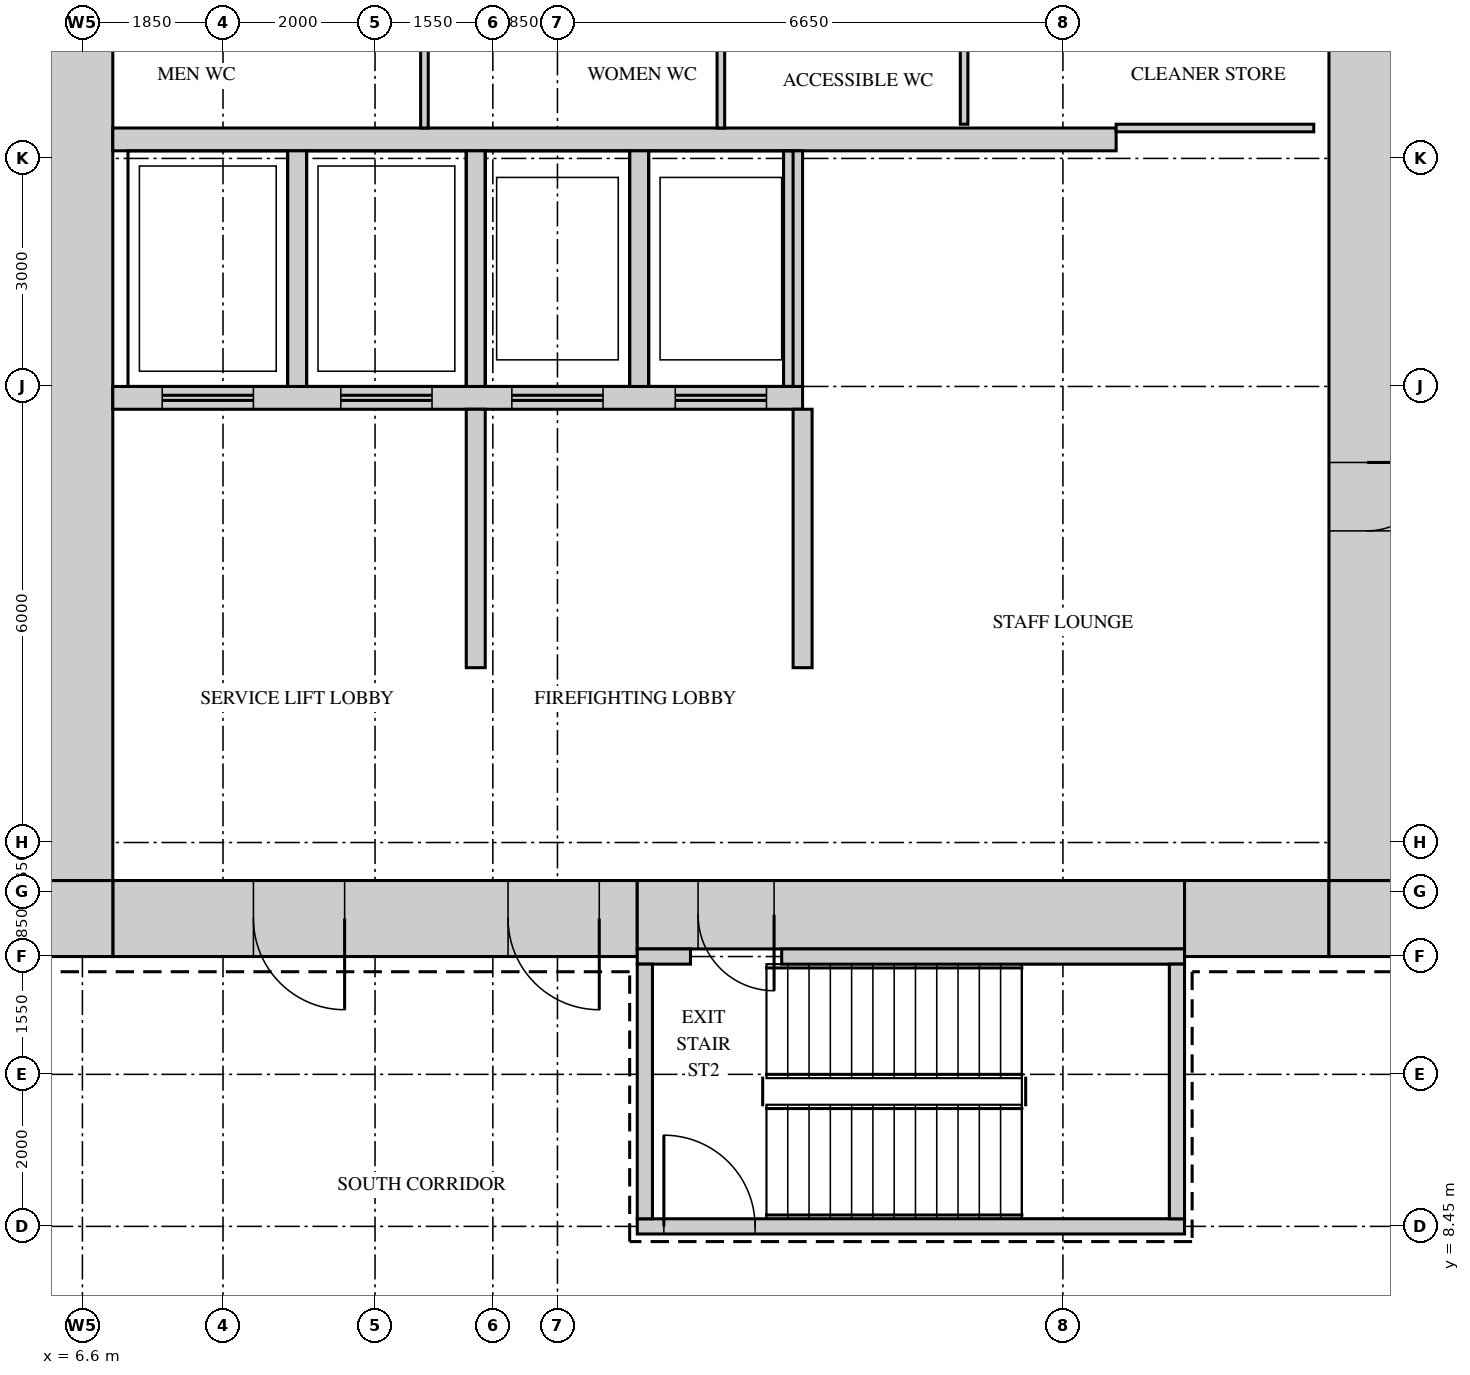
"""IFC4 building model, lengths in metres.
Left out: names, types, materials, properties, quantities, classifications, styles, units other than length and angle.
Written with IfcOpenShell. Run it as: python <this file> out.ifc"""

import sys

from ifc_helpers import new_model, si_unit, direction, frame, frame_2d, origin, place, context, subcontext, project, spatial, rectangle, extrude, source, transform, mapped, element, fill, save


model = new_model("IFC4")
c1 = context("Model", 3, precision=1e-05, world=origin(), true_north=direction((0.0, 1.0)))
c2 = subcontext(c1, "Body", "Model", "MODEL_VIEW")
j1 = project(units=[si_unit("LENGTHUNIT", "METRE"), si_unit("PLANEANGLEUNIT", "RADIAN")], contexts=[c1])
p1 = place(None, origin())
s1 = spatial("IfcSite", under=j1, at=p1, CompositionType="ELEMENT")
p2 = place(p1, origin())
s2 = spatial("IfcBuilding", under=s1, at=p2, CompositionType="ELEMENT")
p3 = place(p2, frame((0.0, 0.0, 141.1)))
s3 = spatial("IfcBuildingStorey", under=s2, at=p3, CompositionType="ELEMENT", Elevation=141.1)
m1 = source(origin(), c2, "Body", "SweptSolid", [
    extrude(rectangle(XDim=6.9, YDim=1.0, at=frame_2d((3.45, 0.0))), origin(), (0.0, 0.0, 1.0), 4.1),
])
p4 = place(p3, frame((7.0, 12.5, 0.0), z_axis=(0.0, 0.0, 1.0), x_axis=(1.0, 0.0, 0.0)))
e1 = element("IfcWall", 1, at=p4, inside=s3, PredefinedType="SHEAR", context=c2, shape_type="MappedRepresentation", body=[
    mapped(m1, transform((0.0, 0.0, 0.0))),
])
m2 = source(origin(), c2, "Body", "SweptSolid", [
    extrude(rectangle(XDim=1.2, YDim=2.1, at=frame_2d((0.6, 1.05))), frame((0.0, 0.51, 0.0), z_axis=(0.0, -1.0, 0.0), x_axis=(1.0, 0.0, 0.0)), (0.0, 0.0, 1.0), 1.02),
])
p5 = place(p4, frame((5.2, 0.0, 0.0)))
e2 = element("IfcOpeningElement", 2, at=p5, cuts=e1, PredefinedType="OPENING", context=c2, shape_type="MappedRepresentation", body=[
    mapped(m2, transform((0.0, 0.0, 0.0))),
])
p6 = place(p4, frame((1.85, 0.0, 0.0)))
e3 = element("IfcOpeningElement", 3, at=p6, cuts=e1, PredefinedType="OPENING", context=c2, shape_type="MappedRepresentation", body=[
    mapped(m2, transform((0.0, 0.0, 0.0))),
])
m3 = source(origin(), c2, "Body", "SweptSolid", [
    extrude(rectangle(XDim=7.2, YDim=0.9, at=frame_2d((3.6, 0.0))), origin(), (0.0, 0.0, 1.0), 4.1),
])
p7 = place(p3, frame((13.9, 12.55, 0.0), z_axis=(0.0, 0.0, 1.0), x_axis=(1.0, 0.0, 0.0)))
e4 = element("IfcWall", 4, at=p7, inside=s3, PredefinedType="SHEAR", context=c2, shape_type="MappedRepresentation", body=[
    mapped(m3, transform((0.0, 0.0, 0.0))),
])
m4 = source(origin(), c2, "Body", "SweptSolid", [
    extrude(rectangle(XDim=1.0, YDim=2.1, at=frame_2d((0.5, 1.05))), frame((0.0, 0.46, 0.0), z_axis=(0.0, -1.0, 0.0), x_axis=(1.0, 0.0, 0.0)), (0.0, 0.0, 1.0), 0.92),
])
p8 = place(p7, frame((0.8, 0.0, 0.0)))
e5 = element("IfcOpeningElement", 5, at=p8, cuts=e4, PredefinedType="OPENING", context=c2, shape_type="MappedRepresentation", body=[
    mapped(m4, transform((0.0, 0.0, 0.0))),
])
m5 = source(origin(), c2, "Body", "SweptSolid", [
    extrude(rectangle(XDim=1.9, YDim=1.0, at=frame_2d((0.95, 0.0))), origin(), (0.0, 0.0, 1.0), 4.1),
])
p9 = place(p3, frame((21.1, 12.5, 0.0), z_axis=(0.0, 0.0, 1.0), x_axis=(1.0, 0.0, 0.0)))
e6 = element("IfcWall", 6, at=p9, inside=s3, PredefinedType="SHEAR", context=c2, shape_type="MappedRepresentation", body=[
    mapped(m5, transform((0.0, 0.0, 0.0))),
])
m6 = source(origin(), c2, "Body", "SweptSolid", [
    extrude(rectangle(XDim=1.0, YDim=1.0, at=frame_2d((0.5, 0.0))), origin(), (0.0, 0.0, 1.0), 4.1),
])
for number, where, z_axis, x_axis in (
    (7, (23.0, 12.5, 0.0), (0.0, 0.0, 1.0), (1.0, 0.0, 0.0)),
    (8, (6.0, 12.5, 0.0), (0.0, 0.0, 1.0), (1.0, 0.0, 0.0)),
):
    element("IfcWall", number, at=place(p3, frame(where, z_axis=z_axis, x_axis=x_axis)), inside=s3, PredefinedType="SHEAR", context=c2, shape_type="MappedRepresentation", body=[
        mapped(m6, transform((0.0, 0.0, 0.0))),
    ])
m7 = source(origin(), c2, "Body", "SweptSolid", [
    extrude(rectangle(XDim=28.0, YDim=1.0, at=frame_2d((14.0, 0.0))), origin(), (0.0, 0.0, 1.0), 4.1),
])
p10 = place(p3, frame((23.5, 13.0, 0.0), z_axis=(0.0, 0.0, 1.0), x_axis=(0.0, 1.0, 0.0)))
e9 = element("IfcWall", 9, at=p10, inside=s3, PredefinedType="SHEAR", context=c2, shape_type="MappedRepresentation", body=[
    mapped(m7, transform((0.0, 0.0, 0.0))),
])
m8 = source(origin(), c2, "Body", "SweptSolid", [
    extrude(rectangle(XDim=1.8, YDim=2.1, at=frame_2d((0.9, 1.05))), frame((0.0, 0.51, 0.0), z_axis=(0.0, -1.0, 0.0), x_axis=(1.0, 0.0, 0.0)), (0.0, 0.0, 1.0), 1.02),
])
p11 = place(p10, frame((22.6, 0.0, 0.0)))
e10 = element("IfcOpeningElement", 10, at=p11, cuts=e9, PredefinedType="OPENING", context=c2, shape_type="MappedRepresentation", body=[
    mapped(m8, transform((0.0, 0.0, 0.0))),
])
p12 = place(p10, frame((12.35, 0.0, 0.0)))
e11 = element("IfcOpeningElement", 11, at=p12, cuts=e9, PredefinedType="OPENING", context=c2, shape_type="MappedRepresentation", body=[
    mapped(m2, transform((0.0, 0.0, 0.0))),
])
m9 = source(origin(), c2, "Body", "SweptSolid", [
    extrude(rectangle(XDim=0.9, YDim=2.1, at=frame_2d((0.45, 1.05))), frame((0.0, 0.51, 0.0), z_axis=(0.0, -1.0, 0.0), x_axis=(1.0, 0.0, 0.0)), (0.0, 0.0, 1.0), 1.02),
])
p13 = place(p10, frame((4.6, 0.0, 0.0)))
e12 = element("IfcOpeningElement", 12, at=p13, cuts=e9, PredefinedType="OPENING", context=c2, shape_type="MappedRepresentation", body=[
    mapped(m9, transform((0.0, 0.0, 0.0))),
])
p14 = place(p3, frame((6.5, 13.0, 0.0), z_axis=(0.0, 0.0, 1.0), x_axis=(0.0, 1.0, 0.0)))
e13 = element("IfcWall", 13, at=p14, inside=s3, PredefinedType="SHEAR", context=c2, shape_type="MappedRepresentation", body=[
    mapped(m7, transform((0.0, 0.0, 0.0))),
])
m10 = source(origin(), c2, "Body", "SweptSolid", [
    extrude(rectangle(XDim=0.7, YDim=0.2, at=frame_2d((0.35, 0.0))), origin(), (0.0, 0.0, 1.0), 4.1),
])
p15 = place(p3, frame((13.9, 12.0, 0.0), z_axis=(0.0, 0.0, 1.0), x_axis=(1.0, 0.0, 0.0)))
e14 = element("IfcWall", 14, at=p15, inside=s3, PredefinedType="SHEAR", context=c2, shape_type="MappedRepresentation", body=[
    mapped(m10, transform((0.0, 0.0, 0.0))),
])
m11 = source(origin(), c2, "Body", "SweptSolid", [
    extrude(rectangle(XDim=5.3, YDim=0.2, at=frame_2d((2.65, 0.0))), origin(), (0.0, 0.0, 1.0), 4.1),
])
p16 = place(p3, frame((15.8, 12.0, 0.0), z_axis=(0.0, 0.0, 1.0), x_axis=(1.0, 0.0, 0.0)))
e15 = element("IfcWall", 15, at=p16, inside=s3, PredefinedType="SHEAR", context=c2, shape_type="MappedRepresentation", body=[
    mapped(m11, transform((0.0, 0.0, 0.0))),
])
m12 = source(origin(), c2, "Body", "SweptSolid", [
    extrude(rectangle(XDim=7.2, YDim=0.2, at=frame_2d((3.6, 0.0))), origin(), (0.0, 0.0, 1.0), 4.1),
])
p17 = place(p3, frame((13.9, 8.45, 0.0), z_axis=(0.0, 0.0, 1.0), x_axis=(1.0, 0.0, 0.0)))
e16 = element("IfcWall", 16, at=p17, inside=s3, PredefinedType="SHEAR", context=c2, shape_type="MappedRepresentation", body=[
    mapped(m12, transform((0.0, 0.0, 0.0))),
])
m13 = source(origin(), c2, "Body", "SweptSolid", [
    extrude(rectangle(XDim=1.2, YDim=2.1, at=frame_2d((0.6, 1.05))), frame((0.0, 0.11, 0.0), z_axis=(0.0, -1.0, 0.0), x_axis=(1.0, 0.0, 0.0)), (0.0, 0.0, 1.0), 0.22),
])
p18 = place(p17, frame((0.35, 0.0, 0.0)))
e17 = element("IfcOpeningElement", 17, at=p18, cuts=e16, PredefinedType="OPENING", context=c2, shape_type="MappedRepresentation", body=[
    mapped(m13, transform((0.0, 0.0, 0.0))),
])
m14 = source(origin(), c2, "Body", "SweptSolid", [
    extrude(rectangle(XDim=3.35, YDim=0.2, at=frame_2d((1.675, 0.0))), origin(), (0.0, 0.0, 1.0), 4.1),
])
for number, where, z_axis, x_axis in (
    (18, (21.0, 8.55, 0.0), (0.0, 0.0, 1.0), (0.0, 1.0, 0.0)),
    (19, (14.0, 8.55, 0.0), (0.0, 0.0, 1.0), (0.0, 1.0, 0.0)),
):
    element("IfcWall", number, at=place(p3, frame(where, z_axis=z_axis, x_axis=x_axis)), inside=s3, PredefinedType="SHEAR", context=c2, shape_type="MappedRepresentation", body=[
        mapped(m14, transform((0.0, 0.0, 0.0))),
    ])
m15 = source(origin(), c2, "Body", "SweptSolid", [
    extrude(rectangle(XDim=13.2, YDim=0.3, at=frame_2d((6.6, 0.0))), origin(), (0.0, 0.0, 1.0), 4.1),
])
p19 = place(p3, frame((7.0, 22.75, 0.0), z_axis=(0.0, 0.0, 1.0), x_axis=(1.0, 0.0, 0.0)))
e20 = element("IfcWall", 20, at=p19, inside=s3, PredefinedType="STANDARD", context=c2, shape_type="MappedRepresentation", body=[
    mapped(m15, transform((0.0, 0.0, 0.0))),
])
m16 = source(origin(), c2, "Body", "SweptSolid", [
    extrude(rectangle(XDim=9.075, YDim=0.3, at=frame_2d((4.538, 0.0))), origin(), (0.0, 0.0, 1.0), 4.1),
])
p20 = place(p3, frame((7.0, 19.35, 0.0), z_axis=(0.0, 0.0, 1.0), x_axis=(1.0, 0.0, 0.0)))
e21 = element("IfcWall", 21, at=p20, inside=s3, PredefinedType="STANDARD", context=c2, shape_type="MappedRepresentation", body=[
    mapped(m16, transform((0.0, 0.0, 0.0))),
])
m17 = source(origin(), c2, "Body", "SweptSolid", [
    extrude(rectangle(XDim=1.2, YDim=2.1, at=frame_2d((0.6, 1.05))), frame((0.0, 0.16, 0.0), z_axis=(0.0, -1.0, 0.0), x_axis=(1.0, 0.0, 0.0)), (0.0, 0.0, 1.0), 0.32),
])
p21 = place(p20, frame((0.65, 0.0, 0.0)))
e22 = element("IfcOpeningElement", 22, at=p21, cuts=e21, PredefinedType="OPENING", context=c2, shape_type="MappedRepresentation", body=[
    mapped(m17, transform((0.0, 0.0, 0.0))),
])
p22 = place(p20, frame((3.0, 0.0, 0.0)))
e23 = element("IfcOpeningElement", 23, at=p22, cuts=e21, PredefinedType="OPENING", context=c2, shape_type="MappedRepresentation", body=[
    mapped(m17, transform((0.0, 0.0, 0.0))),
])
p23 = place(p20, frame((5.25, 0.0, 0.0)))
e24 = element("IfcOpeningElement", 24, at=p23, cuts=e21, PredefinedType="OPENING", context=c2, shape_type="MappedRepresentation", body=[
    mapped(m17, transform((0.0, 0.0, 0.0))),
])
p24 = place(p20, frame((7.4, 0.0, 0.0)))
e25 = element("IfcOpeningElement", 25, at=p24, cuts=e21, PredefinedType="OPENING", context=c2, shape_type="MappedRepresentation", body=[
    mapped(m17, transform((0.0, 0.0, 0.0))),
])
m18 = source(origin(), c2, "Body", "SweptSolid", [
    extrude(rectangle(XDim=3.1, YDim=0.25, at=frame_2d((1.55, 0.0))), origin(), (0.0, 0.0, 1.0), 4.1),
])
for number, where, z_axis, x_axis in (
    (26, (9.425, 19.5, 0.0), (0.0, 0.0, 1.0), (0.0, 1.0, 0.0)),
    (27, (11.775, 19.5, 0.0), (0.0, 0.0, 1.0), (0.0, 1.0, 0.0)),
    (28, (13.925, 19.5, 0.0), (0.0, 0.0, 1.0), (0.0, 1.0, 0.0)),
    (29, (15.95, 19.5, 0.0), (0.0, 0.0, 1.0), (0.0, 1.0, 0.0)),
):
    element("IfcWall", number, at=place(p3, frame(where, z_axis=z_axis, x_axis=x_axis)), inside=s3, PredefinedType="STANDARD", context=c2, shape_type="MappedRepresentation", body=[
        mapped(m18, transform((0.0, 0.0, 0.0))),
    ])
m19 = source(origin(), c2, "Body", "SweptSolid", [
    extrude(rectangle(XDim=3.4, YDim=0.25, at=frame_2d((1.7, 0.0))), origin(), (0.0, 0.0, 1.0), 4.1),
])
for number, where, z_axis, x_axis in (
    (30, (16.075, 15.8, 0.0), (0.0, 0.0, 1.0), (0.0, 1.0, 0.0)),
    (31, (11.775, 15.8, 0.0), (0.0, 0.0, 1.0), (0.0, 1.0, 0.0)),
):
    element("IfcWall", number, at=place(p3, frame(where, z_axis=z_axis, x_axis=x_axis)), inside=s3, PredefinedType="STANDARD", context=c2, shape_type="MappedRepresentation", body=[
        mapped(m19, transform((0.0, 0.0, 0.0))),
    ])
m20 = source(origin(), c2, "Body", "SweptSolid", [
    extrude(rectangle(XDim=2.05, YDim=0.1, at=frame_2d((1.025, 0.0))), origin(), (0.0, 0.0, 1.0), 4.2),
])
for number, where, z_axis, x_axis in (
    (32, (11.1, 22.9, 0.0), (0.0, 0.0, 1.0), (0.0, 1.0, 0.0)),
    (33, (15.0, 22.9, 0.0), (0.0, 0.0, 1.0), (0.0, 1.0, 0.0)),
):
    element("IfcWall", number, at=place(p3, frame(where, z_axis=z_axis, x_axis=x_axis)), inside=s3, PredefinedType="PARTITIONING", context=c2, shape_type="MappedRepresentation", body=[
        mapped(m20, transform((0.0, 0.0, 0.0))),
    ])
m21 = source(origin(), c2, "Body", "SweptSolid", [
    extrude(rectangle(XDim=2.6, YDim=0.1, at=frame_2d((1.3, 0.0))), origin(), (0.0, 0.0, 1.0), 4.2),
])
p25 = place(p3, frame((20.2, 22.9, 0.0), z_axis=(0.0, 0.0, 1.0), x_axis=(1.0, 0.0, 0.0)))
e34 = element("IfcWall", 34, at=p25, inside=s3, PredefinedType="PARTITIONING", context=c2, shape_type="MappedRepresentation", body=[
    mapped(m21, transform((0.0, 0.0, 0.0))),
])
m22 = source(origin(), c2, "Body", "SweptSolid", [
    extrude(rectangle(XDim=2.0, YDim=0.1, at=frame_2d((1.0, 0.0))), origin(), (0.0, 0.0, 1.0), 4.2),
])
p26 = place(p3, frame((18.2, 22.95, 0.0), z_axis=(0.0, 0.0, 1.0), x_axis=(0.0, 1.0, 0.0)))
e35 = element("IfcWall", 35, at=p26, inside=s3, PredefinedType="PARTITIONING", context=c2, shape_type="MappedRepresentation", body=[
    mapped(m22, transform((0.0, 0.0, 0.0))),
])
m23 = source(origin(), c2, "Body", "SweptSolid", [
    extrude(rectangle(XDim=0.9, YDim=2.1, at=frame_2d((0.45, 1.05))), frame((0.0, 0.45, 0.0), z_axis=(0.0, -1.0, 0.0), x_axis=(1.0, 0.0, 0.0)), (0.0, 0.0, 1.0), 0.9),
])
p27 = place(p13, origin())
e36 = element("IfcDoor", 36, at=p27, inside=s3, OperationType="SINGLE_SWING_RIGHT", PredefinedType="DOOR", context=c2, shape_type="MappedRepresentation", body=[
    mapped(m23, transform((0.0, 0.0, 0.0))),
])
fill(e12, e36)
m24 = source(origin(), c2, "Body", "SweptSolid", [
    extrude(rectangle(XDim=1.2, YDim=2.1, at=frame_2d((0.6, 1.05))), frame((0.0, 0.45, 0.0), z_axis=(0.0, -1.0, 0.0), x_axis=(1.0, 0.0, 0.0)), (0.0, 0.0, 1.0), 0.9),
])
p28 = place(p5, origin())
e37 = element("IfcDoor", 37, at=p28, inside=s3, OperationType="SINGLE_SWING_RIGHT", PredefinedType="DOOR", context=c2, shape_type="MappedRepresentation", body=[
    mapped(m24, transform((0.0, 0.0, 0.0))),
])
fill(e2, e37)
p29 = place(p6, origin())
e38 = element("IfcDoor", 38, at=p29, inside=s3, OperationType="SINGLE_SWING_RIGHT", PredefinedType="DOOR", context=c2, shape_type="MappedRepresentation", body=[
    mapped(m24, transform((0.0, 0.0, 0.0))),
])
fill(e3, e38)
m25 = source(origin(), c2, "Body", "SweptSolid", [
    extrude(rectangle(XDim=1.0, YDim=2.1, at=frame_2d((0.5, 1.05))), frame((0.0, 0.4, 0.0), z_axis=(0.0, -1.0, 0.0), x_axis=(1.0, 0.0, 0.0)), (0.0, 0.0, 1.0), 0.8),
])
p30 = place(p8, origin())
e39 = element("IfcDoor", 39, at=p30, inside=s3, OperationType="SINGLE_SWING_RIGHT", PredefinedType="DOOR", context=c2, shape_type="MappedRepresentation", body=[
    mapped(m25, transform((0.0, 0.0, 0.0))),
])
fill(e5, e39)
m26 = source(origin(), c2, "Body", "SweptSolid", [
    extrude(rectangle(XDim=1.2, YDim=2.1, at=frame_2d((0.6, 1.05))), frame((0.0, 0.025, 0.0), z_axis=(0.0, -1.0, 0.0), x_axis=(1.0, 0.0, 0.0)), (0.0, 0.0, 1.0), 0.05),
])
p31 = place(p18, origin())
e40 = element("IfcDoor", 40, at=p31, inside=s3, OperationType="SINGLE_SWING_RIGHT", PredefinedType="DOOR", context=c2, shape_type="MappedRepresentation", body=[
    mapped(m26, transform((0.0, 0.0, 0.0))),
])
fill(e17, e40)
p32 = place(p21, origin())
e41 = element("IfcDoor", 41, at=p32, inside=s3, OperationType="DOUBLE_DOOR_SLIDING", PredefinedType="DOOR", context=c2, shape_type="MappedRepresentation", body=[
    mapped(m26, transform((0.0, 0.0, 0.0))),
])
fill(e22, e41)
p33 = place(p22, origin())
e42 = element("IfcDoor", 42, at=p33, inside=s3, OperationType="DOUBLE_DOOR_SLIDING", PredefinedType="DOOR", context=c2, shape_type="MappedRepresentation", body=[
    mapped(m26, transform((0.0, 0.0, 0.0))),
])
fill(e23, e42)
p34 = place(p23, origin())
e43 = element("IfcDoor", 43, at=p34, inside=s3, OperationType="DOUBLE_DOOR_SLIDING", PredefinedType="DOOR", context=c2, shape_type="MappedRepresentation", body=[
    mapped(m26, transform((0.0, 0.0, 0.0))),
])
fill(e24, e43)
p35 = place(p24, origin())
e44 = element("IfcDoor", 44, at=p35, inside=s3, OperationType="DOUBLE_DOOR_SLIDING", PredefinedType="DOOR", context=c2, shape_type="MappedRepresentation", body=[
    mapped(m26, transform((0.0, 0.0, 0.0))),
])
fill(e25, e44)
save(model, sys.argv[1])
